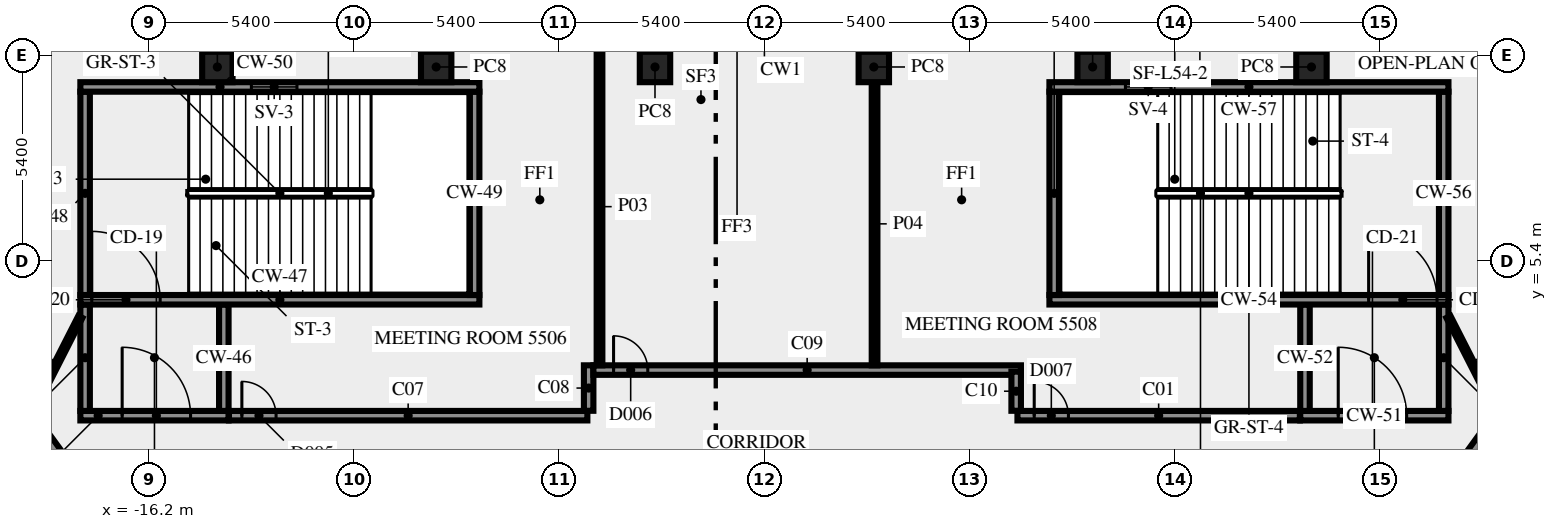
"""IFC4 building model, lengths in metres.
Left out: names, types, materials, properties, quantities, classifications, styles, units other than length and angle.
Written with IfcOpenShell. Run it as: python <this file> out.ifc"""

import sys

from ifc_helpers import new_model, si_unit, direction, frame, frame_2d, origin, origin_2d, place, context, subcontext, project, spatial, rectangle, extrude, element, fill, save


model = new_model("IFC4")
c1 = context("Model", 3, precision=1e-05, world=origin(), true_north=direction((0.0, 1.0)))
c2 = subcontext(c1, "Body", "Model", "MODEL_VIEW")
j1 = project(units=[si_unit("LENGTHUNIT", "METRE"), si_unit("PLANEANGLEUNIT", "RADIAN")], contexts=[c1])
p1 = place(None, origin())
s1 = spatial("IfcSite", under=j1, at=p1, CompositionType="ELEMENT")
p2 = place(p1, origin())
s2 = spatial("IfcBuilding", under=s1, at=p2, CompositionType="ELEMENT")
p3 = place(p2, frame((0.0, 0.0, 234.0)))
s3 = spatial("IfcBuildingStorey", under=s2, at=p3, CompositionType="ELEMENT", Elevation=234.0)
for number, where, z_axis, x_axis in (
    (1, (14.395, 10.5, 0.0), (0.0, 0.0, 1.0), (-1.0, 0.0, 0.0)),
    (2, (8.637, 10.5, 0.0), (0.0, 0.0, 1.0), (-1.0, 0.0, 0.0)),
    (3, (2.879, 10.5, 0.0), (0.0, 0.0, 1.0), (-1.0, 0.0, 0.0)),
    (4, (-2.879, 10.5, 0.0), (0.0, 0.0, 1.0), (-1.0, 0.0, 0.0)),
    (5, (-8.637, 10.5, 0.0), (0.0, 0.0, 1.0), (-1.0, 0.0, 0.0)),
    (6, (-14.395, 10.5, 0.0), (0.0, 0.0, 1.0), (-1.0, 0.0, 0.0)),
):
    element("IfcColumn", number, at=place(p3, frame(where, z_axis=z_axis, x_axis=x_axis)), inside=s3, PredefinedType="COLUMN", context=c2, shape_type="SweptSolid", body=[
        extrude(rectangle(XDim=0.8, YDim=0.8, at=origin_2d()), origin(), (0.0, 0.0, 1.0), 3.65),
    ])
p4 = place(p3, frame((-18.0, 1.325, 0.0), z_axis=(0.0, 0.0, 1.0), x_axis=(1.0, 0.0, 0.0)))
e7 = element("IfcWall", 7, at=p4, inside=s3, PredefinedType="SHEAR", context=c2, shape_type="SweptSolid", body=[
    extrude(rectangle(XDim=3.9, YDim=0.25, at=frame_2d((1.95, 0.0))), origin(), (0.0, 0.0, 1.0), 3.65),
])
p5 = place(p4, frame((1.1, 0.0, 0.0)))
e8 = element("IfcOpeningElement", 8, at=p5, cuts=e7, PredefinedType="OPENING", context=c2, shape_type="SweptSolid", body=[
    extrude(rectangle(XDim=1.8, YDim=2.1, at=frame_2d((0.9, 1.05))), frame((0.0, 0.135, 0.0), z_axis=(0.0, -1.0, 0.0), x_axis=(1.0, 0.0, 0.0)), (0.0, 0.0, 1.0), 0.27),
])
for number, where, z_axis, x_axis in (
    (9, (-17.875, 1.45, 0.0), (0.0, 0.0, 1.0), (0.0, 1.0, 0.0)),
    (10, (-14.225, 1.45, 0.0), (0.0, 0.0, 1.0), (0.0, 1.0, 0.0)),
):
    element("IfcWall", number, at=place(p3, frame(where, z_axis=z_axis, x_axis=x_axis)), inside=s3, PredefinedType="SHEAR", context=c2, shape_type="SweptSolid", body=[
        extrude(rectangle(XDim=2.8, YDim=0.25, at=frame_2d((1.4, 0.0))), origin(), (0.0, 0.0, 1.0), 3.65),
    ])
p6 = place(p3, frame((-18.0, 4.375, 0.0), z_axis=(0.0, 0.0, 1.0), x_axis=(1.0, 0.0, 0.0)))
e11 = element("IfcWall", 11, at=p6, inside=s3, PredefinedType="SHEAR", context=c2, shape_type="SweptSolid", body=[
    extrude(rectangle(XDim=10.5, YDim=0.25, at=frame_2d((5.25, 0.0))), origin(), (0.0, 0.0, 1.0), 3.65),
])
p7 = place(p6, frame((0.3, 0.0, 0.0)))
e12 = element("IfcOpeningElement", 12, at=p7, cuts=e11, PredefinedType="OPENING", context=c2, shape_type="SweptSolid", body=[
    extrude(rectangle(XDim=1.8, YDim=2.1, at=frame_2d((0.9, 1.05))), frame((0.0, 0.135, 0.0), z_axis=(0.0, -1.0, 0.0), x_axis=(1.0, 0.0, 0.0)), (0.0, 0.0, 1.0), 0.27),
])
for number, where, z_axis, x_axis in (
    (13, (-17.875, 4.5, 0.0), (0.0, 0.0, 1.0), (0.0, 1.0, 0.0)),
    (14, (-7.625, 4.5, 0.0), (0.0, 0.0, 1.0), (0.0, 1.0, 0.0)),
):
    element("IfcWall", number, at=place(p3, frame(where, z_axis=z_axis, x_axis=x_axis)), inside=s3, PredefinedType="SHEAR", context=c2, shape_type="SweptSolid", body=[
        extrude(rectangle(XDim=5.35, YDim=0.25, at=frame_2d((2.675, 0.0))), origin(), (0.0, 0.0, 1.0), 3.65),
    ])
p8 = place(p3, frame((-18.0, 9.975, 0.0), z_axis=(0.0, 0.0, 1.0), x_axis=(1.0, 0.0, 0.0)))
e15 = element("IfcWall", 15, at=p8, inside=s3, PredefinedType="SHEAR", context=c2, shape_type="SweptSolid", body=[
    extrude(rectangle(XDim=10.5, YDim=0.25, at=frame_2d((5.25, 0.0))), origin(), (0.0, 0.0, 1.0), 3.65),
])
p9 = place(p8, frame((4.5, 0.0, 1.0)))
e16 = element("IfcOpeningElement", 16, at=p9, cuts=e15, PredefinedType="OPENING", context=c2, shape_type="SweptSolid", body=[
    extrude(rectangle(XDim=1.2, YDim=1.2, at=frame_2d((0.6, 0.6))), frame((0.0, 0.135, 0.0), z_axis=(0.0, -1.0, 0.0), x_axis=(1.0, 0.0, 0.0)), (0.0, 0.0, 1.0), 0.27),
])
p10 = place(p3, frame((14.1, 1.325, 0.0), z_axis=(0.0, 0.0, 1.0), x_axis=(1.0, 0.0, 0.0)))
e17 = element("IfcWall", 17, at=p10, inside=s3, PredefinedType="SHEAR", context=c2, shape_type="SweptSolid", body=[
    extrude(rectangle(XDim=3.9, YDim=0.25, at=frame_2d((1.95, 0.0))), origin(), (0.0, 0.0, 1.0), 3.65),
])
p11 = place(p10, frame((1.0, 0.0, 0.0)))
e18 = element("IfcOpeningElement", 18, at=p11, cuts=e17, PredefinedType="OPENING", context=c2, shape_type="SweptSolid", body=[
    extrude(rectangle(XDim=1.8, YDim=2.1, at=frame_2d((0.9, 1.05))), frame((0.0, 0.135, 0.0), z_axis=(0.0, -1.0, 0.0), x_axis=(1.0, 0.0, 0.0)), (0.0, 0.0, 1.0), 0.27),
])
for number, where, z_axis, x_axis in (
    (19, (14.225, 1.45, 0.0), (0.0, 0.0, 1.0), (0.0, 1.0, 0.0)),
    (20, (17.875, 1.45, 0.0), (0.0, 0.0, 1.0), (0.0, 1.0, 0.0)),
):
    element("IfcWall", number, at=place(p3, frame(where, z_axis=z_axis, x_axis=x_axis)), inside=s3, PredefinedType="SHEAR", context=c2, shape_type="SweptSolid", body=[
        extrude(rectangle(XDim=2.8, YDim=0.25, at=frame_2d((1.4, 0.0))), origin(), (0.0, 0.0, 1.0), 3.65),
    ])
p12 = place(p3, frame((7.5, 4.375, 0.0), z_axis=(0.0, 0.0, 1.0), x_axis=(1.0, 0.0, 0.0)))
e21 = element("IfcWall", 21, at=p12, inside=s3, PredefinedType="SHEAR", context=c2, shape_type="SweptSolid", body=[
    extrude(rectangle(XDim=10.5, YDim=0.25, at=frame_2d((5.25, 0.0))), origin(), (0.0, 0.0, 1.0), 3.65),
])
p13 = place(p12, frame((8.4, 0.0, 0.0)))
e22 = element("IfcOpeningElement", 22, at=p13, cuts=e21, PredefinedType="OPENING", context=c2, shape_type="SweptSolid", body=[
    extrude(rectangle(XDim=1.8, YDim=2.1, at=frame_2d((0.9, 1.05))), frame((0.0, 0.135, 0.0), z_axis=(0.0, -1.0, 0.0), x_axis=(1.0, 0.0, 0.0)), (0.0, 0.0, 1.0), 0.27),
])
for number, where, z_axis, x_axis in (
    (23, (7.625, 4.5, 0.0), (0.0, 0.0, 1.0), (0.0, 1.0, 0.0)),
    (24, (17.875, 4.5, 0.0), (0.0, 0.0, 1.0), (0.0, 1.0, 0.0)),
):
    element("IfcWall", number, at=place(p3, frame(where, z_axis=z_axis, x_axis=x_axis)), inside=s3, PredefinedType="SHEAR", context=c2, shape_type="SweptSolid", body=[
        extrude(rectangle(XDim=5.35, YDim=0.25, at=frame_2d((2.675, 0.0))), origin(), (0.0, 0.0, 1.0), 3.65),
    ])
p14 = place(p3, frame((7.5, 9.975, 0.0), z_axis=(0.0, 0.0, 1.0), x_axis=(1.0, 0.0, 0.0)))
e25 = element("IfcWall", 25, at=p14, inside=s3, PredefinedType="SHEAR", context=c2, shape_type="SweptSolid", body=[
    extrude(rectangle(XDim=10.5, YDim=0.25, at=frame_2d((5.25, 0.0))), origin(), (0.0, 0.0, 1.0), 3.65),
])
p15 = place(p14, frame((2.0, 0.0, 1.0)))
e26 = element("IfcOpeningElement", 26, at=p15, cuts=e25, PredefinedType="OPENING", context=c2, shape_type="SweptSolid", body=[
    extrude(rectangle(XDim=1.2, YDim=1.2, at=frame_2d((0.6, 0.6))), frame((0.0, 0.135, 0.0), z_axis=(0.0, -1.0, 0.0), x_axis=(1.0, 0.0, 0.0)), (0.0, 0.0, 1.0), 0.27),
])
p16 = place(p3, frame((6.659, 1.325, 0.0), z_axis=(0.0, 0.0, 1.0), x_axis=(1.0, 0.0, 0.0)))
e27 = element("IfcWall", 27, at=p16, inside=s3, PredefinedType="SOLIDWALL", context=c2, shape_type="SweptSolid", body=[
    extrude(rectangle(XDim=7.431, YDim=0.25, at=frame_2d((3.716, 0.0))), origin(), (0.0, 0.0, 1.0), 3.65),
])
p17 = place(p16, frame((0.441, 0.0, 0.0)))
e28 = element("IfcOpeningElement", 28, at=p17, cuts=e27, PredefinedType="OPENING", context=c2, shape_type="SweptSolid", body=[
    extrude(rectangle(XDim=0.9, YDim=2.1, at=frame_2d((0.45, 1.05))), frame((0.0, 0.135, 0.0), z_axis=(0.0, -1.0, 0.0), x_axis=(1.0, 0.0, 0.0)), (0.0, 0.0, 1.0), 0.27),
])
p18 = place(p3, frame((17.545, -1.125, 0.0), z_axis=(0.0, 0.0, 1.0), x_axis=(0.587796810203, 0.809008596935, 0.0)))
e29 = element("IfcWall", 29, at=p18, inside=s3, PredefinedType="SOLIDWALL", context=c2, shape_type="SweptSolid", body=[
    extrude(rectangle(XDim=12.703, YDim=0.25, at=frame_2d((6.352, 0.0))), origin(), (0.0, 0.0, 1.0), 3.65),
])
p19 = place(p18, frame((11.329, 0.0, 0.0)))
e30 = element("IfcOpeningElement", 30, at=p19, cuts=e29, PredefinedType="OPENING", context=c2, shape_type="SweptSolid", body=[
    extrude(rectangle(XDim=0.9, YDim=2.1, at=frame_2d((0.45, 1.05))), frame((0.0, 0.135, 0.0), z_axis=(0.0, -1.0, 0.0), x_axis=(1.0, 0.0, 0.0)), (0.0, 0.0, 1.0), 0.27),
])
p20 = place(p3, frame((-38.32, 27.469, 0.0), z_axis=(0.0, 0.0, 1.0), x_axis=(0.587788021768, -0.809014982226, 0.0)))
e31 = element("IfcWall", 31, at=p20, inside=s3, PredefinedType="SOLIDWALL", context=c2, shape_type="SweptSolid", body=[
    extrude(rectangle(XDim=35.344, YDim=0.25, at=frame_2d((17.672, 0.0))), origin(), (0.0, 0.0, 1.0), 3.65),
])
p21 = place(p20, frame((31.003, 0.0, 0.0)))
e32 = element("IfcOpeningElement", 32, at=p21, cuts=e31, PredefinedType="OPENING", context=c2, shape_type="SweptSolid", body=[
    extrude(rectangle(XDim=0.9, YDim=2.1, at=frame_2d((0.45, 1.05))), frame((0.0, 0.135, 0.0), z_axis=(0.0, -1.0, 0.0), x_axis=(1.0, 0.0, 0.0)), (0.0, 0.0, 1.0), 0.27),
])
p22 = place(p20, frame((11.286, 0.0, 0.0)))
e33 = element("IfcOpeningElement", 33, at=p22, cuts=e31, PredefinedType="OPENING", context=c2, shape_type="SweptSolid", body=[
    extrude(rectangle(XDim=0.9, YDim=2.1, at=frame_2d((0.45, 1.05))), frame((0.0, 0.135, 0.0), z_axis=(0.0, -1.0, 0.0), x_axis=(1.0, 0.0, 0.0)), (0.0, 0.0, 1.0), 0.27),
])
p23 = place(p3, frame((-14.09, 1.325, 0.0), z_axis=(0.0, 0.0, 1.0), x_axis=(1.0, 0.0, 0.0)))
e34 = element("IfcWall", 34, at=p23, inside=s3, PredefinedType="SOLIDWALL", context=c2, shape_type="SweptSolid", body=[
    extrude(rectangle(XDim=9.431, YDim=0.25, at=frame_2d((4.716, 0.0))), origin(), (0.0, 0.0, 1.0), 3.65),
])
p24 = place(p23, frame((0.34, 0.0, 0.0)))
e35 = element("IfcOpeningElement", 35, at=p24, cuts=e34, PredefinedType="OPENING", context=c2, shape_type="SweptSolid", body=[
    extrude(rectangle(XDim=0.9, YDim=2.1, at=frame_2d((0.45, 1.05))), frame((0.0, 0.135, 0.0), z_axis=(0.0, -1.0, 0.0), x_axis=(1.0, 0.0, 0.0)), (0.0, 0.0, 1.0), 0.27),
])
p25 = place(p3, frame((-4.625, 1.454, 0.0), z_axis=(0.0, 0.0, 1.0), x_axis=(0.0, 1.0, 0.0)))
e36 = element("IfcWall", 36, at=p25, inside=s3, PredefinedType="SOLIDWALL", context=c2, shape_type="SweptSolid", body=[
    extrude(rectangle(XDim=1.196, YDim=0.25, at=frame_2d((0.598, 0.0))), origin(), (0.0, 0.0, 1.0), 3.65),
])
p26 = place(p3, frame((-4.5, 2.525, 0.0), z_axis=(0.0, 0.0, 1.0), x_axis=(1.0, 0.0, 0.0)))
e37 = element("IfcWall", 37, at=p26, inside=s3, PredefinedType="SOLIDWALL", context=c2, shape_type="SweptSolid", body=[
    extrude(rectangle(XDim=11.25, YDim=0.25, at=frame_2d((5.625, 0.0))), origin(), (0.0, 0.0, 1.0), 3.65),
])
p27 = place(p26, frame((0.531, 0.0, 0.0)))
e38 = element("IfcOpeningElement", 38, at=p27, cuts=e37, PredefinedType="OPENING", context=c2, shape_type="SweptSolid", body=[
    extrude(rectangle(XDim=0.9, YDim=2.1, at=frame_2d((0.45, 1.05))), frame((0.0, 0.135, 0.0), z_axis=(0.0, -1.0, 0.0), x_axis=(1.0, 0.0, 0.0)), (0.0, 0.0, 1.0), 0.27),
])
p28 = place(p3, frame((6.625, 2.484, 0.0), z_axis=(0.0, 0.0, 1.0), x_axis=(0.0, -1.0, 0.0)))
e39 = element("IfcWall", 39, at=p28, inside=s3, PredefinedType="SOLIDWALL", context=c2, shape_type="SweptSolid", body=[
    extrude(rectangle(XDim=1.03, YDim=0.25, at=frame_2d((0.515, 0.0))), origin(), (0.0, 0.0, 1.0), 3.65),
])
p29 = place(p3, frame((24.898, 9.209, 0.0), z_axis=(0.0, 0.0, 1.0), x_axis=(-0.809013490065, 0.587790075531, 0.0)))
e40 = element("IfcWall", 40, at=p29, inside=s3, PredefinedType="PARTITIONING", context=c2, shape_type="SweptSolid", body=[
    extrude(rectangle(XDim=9.549, YDim=0.12, at=frame_2d((4.775, 0.0))), origin(), (0.0, 0.0, 1.0), 2.85),
])
p30 = place(p3, frame((-4.339, 2.65, 0.0), z_axis=(0.0, 0.0, 1.0), x_axis=(0.0, 1.0, 0.0)))
e41 = element("IfcWall", 41, at=p30, inside=s3, PredefinedType="PARTITIONING", context=c2, shape_type="SweptSolid", body=[
    extrude(rectangle(XDim=8.35, YDim=0.15, at=frame_2d((4.175, 0.0))), origin(), (0.0, 0.0, 1.0), 2.85),
])
p31 = place(p3, frame((2.899, 10.095, 0.0), z_axis=(0.0, 0.0, 1.0), x_axis=(0.0, -1.0, 0.0)))
e42 = element("IfcWall", 42, at=p31, inside=s3, PredefinedType="PARTITIONING", context=c2, shape_type="SweptSolid", body=[
    extrude(rectangle(XDim=7.445, YDim=0.15, at=frame_2d((3.723, 0.0))), origin(), (0.0, 0.0, 1.0), 3.65),
])
for number, where, z_axis, x_axis in (
    (43, (18.0, 3.925, 0.0), (0.0, 0.0, 1.0), (0.454, -0.891, 0.0)),
    (44, (-19.261, 1.45, 0.0), (0.0, 0.0, 1.0), (0.454, 0.891, 0.0)),
):
    element("IfcWall", number, at=place(p3, frame(where, z_axis=z_axis, x_axis=x_axis)), inside=s3, PredefinedType="PARTITIONING", context=c2, shape_type="SweptSolid", body=[
        extrude(rectangle(XDim=2.778, YDim=0.12, at=frame_2d((1.389, 0.0))), origin(), (0.0, 0.0, 1.0), 3.65),
    ])
p32 = place(p5, origin())
e45 = element("IfcDoor", 45, at=p32, inside=s3, OperationType="DOUBLE_DOOR_SINGLE_SWING", PredefinedType="DOOR", context=c2, shape_type="SweptSolid", body=[
    extrude(rectangle(XDim=1.8, YDim=2.1, at=frame_2d((0.9, 1.05))), frame((0.0, 0.025, 0.0), z_axis=(0.0, -1.0, 0.0), x_axis=(1.0, 0.0, 0.0)), (0.0, 0.0, 1.0), 0.05),
])
fill(e8, e45)
p33 = place(p7, origin())
e46 = element("IfcDoor", 46, at=p33, inside=s3, OperationType="DOUBLE_DOOR_SINGLE_SWING", PredefinedType="DOOR", context=c2, shape_type="SweptSolid", body=[
    extrude(rectangle(XDim=1.8, YDim=2.1, at=frame_2d((0.9, 1.05))), frame((0.0, 0.025, 0.0), z_axis=(0.0, -1.0, 0.0), x_axis=(1.0, 0.0, 0.0)), (0.0, 0.0, 1.0), 0.05),
])
fill(e12, e46)
p34 = place(p9, origin())
e47 = element("IfcWindow", 47, at=p34, inside=s3, PartitioningType="SINGLE_PANEL", PredefinedType="WINDOW", context=c2, shape_type="SweptSolid", body=[
    extrude(rectangle(XDim=1.2, YDim=1.2, at=frame_2d((0.6, 0.6))), frame((0.0, 0.03, 0.0), z_axis=(0.0, -1.0, 0.0), x_axis=(1.0, 0.0, 0.0)), (0.0, 0.0, 1.0), 0.06),
])
fill(e16, e47)
p35 = place(p11, origin())
e48 = element("IfcDoor", 48, at=p35, inside=s3, OperationType="DOUBLE_DOOR_SINGLE_SWING", PredefinedType="DOOR", context=c2, shape_type="SweptSolid", body=[
    extrude(rectangle(XDim=1.8, YDim=2.1, at=frame_2d((0.9, 1.05))), frame((0.0, 0.025, 0.0), z_axis=(0.0, -1.0, 0.0), x_axis=(1.0, 0.0, 0.0)), (0.0, 0.0, 1.0), 0.05),
])
fill(e18, e48)
p36 = place(p13, origin())
e49 = element("IfcDoor", 49, at=p36, inside=s3, OperationType="DOUBLE_DOOR_SINGLE_SWING", PredefinedType="DOOR", context=c2, shape_type="SweptSolid", body=[
    extrude(rectangle(XDim=1.8, YDim=2.1, at=frame_2d((0.9, 1.05))), frame((0.0, 0.025, 0.0), z_axis=(0.0, -1.0, 0.0), x_axis=(1.0, 0.0, 0.0)), (0.0, 0.0, 1.0), 0.05),
])
fill(e22, e49)
p37 = place(p15, origin())
e50 = element("IfcWindow", 50, at=p37, inside=s3, PartitioningType="SINGLE_PANEL", PredefinedType="WINDOW", context=c2, shape_type="SweptSolid", body=[
    extrude(rectangle(XDim=1.2, YDim=1.2, at=frame_2d((0.6, 0.6))), frame((0.0, 0.03, 0.0), z_axis=(0.0, -1.0, 0.0), x_axis=(1.0, 0.0, 0.0)), (0.0, 0.0, 1.0), 0.06),
])
fill(e26, e50)
p38 = place(p24, origin())
e51 = element("IfcDoor", 51, at=p38, inside=s3, OperationType="SINGLE_SWING_LEFT", PredefinedType="DOOR", context=c2, shape_type="SweptSolid", body=[
    extrude(rectangle(XDim=0.9, YDim=2.1, at=frame_2d((0.45, 1.05))), frame((0.0, 0.025, 0.0), z_axis=(0.0, -1.0, 0.0), x_axis=(1.0, 0.0, 0.0)), (0.0, 0.0, 1.0), 0.05),
])
fill(e35, e51)
p39 = place(p17, origin())
e52 = element("IfcDoor", 52, at=p39, inside=s3, OperationType="SINGLE_SWING_LEFT", PredefinedType="DOOR", context=c2, shape_type="SweptSolid", body=[
    extrude(rectangle(XDim=0.9, YDim=2.1, at=frame_2d((0.45, 1.05))), frame((0.0, 0.025, 0.0), z_axis=(0.0, -1.0, 0.0), x_axis=(1.0, 0.0, 0.0)), (0.0, 0.0, 1.0), 0.05),
])
fill(e28, e52)
p40 = place(p27, origin())
e53 = element("IfcDoor", 53, at=p40, inside=s3, OperationType="SINGLE_SWING_LEFT", PredefinedType="DOOR", context=c2, shape_type="SweptSolid", body=[
    extrude(rectangle(XDim=0.9, YDim=2.1, at=frame_2d((0.45, 1.05))), frame((0.0, 0.025, 0.0), z_axis=(0.0, -1.0, 0.0), x_axis=(1.0, 0.0, 0.0)), (0.0, 0.0, 1.0), 0.05),
])
fill(e38, e53)
save(model, sys.argv[1])
